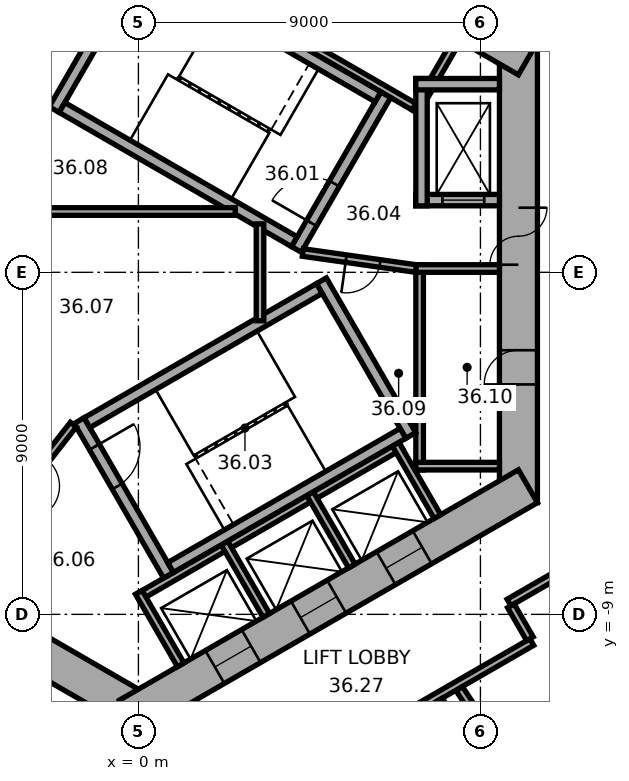
"""IFC4 building model, lengths in metres.
Left out: names, types, materials, properties, quantities, classifications, styles, units other than length and angle.
Written with IfcOpenShell. Run it as: python <this file> out.ifc"""

import sys

from ifc_helpers import new_model, si_unit, direction, frame, frame_2d, origin, place, context, subcontext, project, spatial, rectangle, extrude, element, fill, save


model = new_model("IFC4")
c1 = context("Model", 3, precision=1e-05, world=origin(), true_north=direction((0.0, 1.0)))
c2 = subcontext(c1, "Body", "Model", "MODEL_VIEW")
j1 = project(units=[si_unit("LENGTHUNIT", "METRE"), si_unit("PLANEANGLEUNIT", "RADIAN")], contexts=[c1])
p1 = place(None, origin())
s1 = spatial("IfcSite", under=j1, at=p1, CompositionType="ELEMENT")
p2 = place(p1, origin())
s2 = spatial("IfcBuilding", under=s1, at=p2, CompositionType="ELEMENT")
p3 = place(p2, frame((0.0, 0.0, 150.3)))
s3 = spatial("IfcBuildingStorey", under=s2, at=p3, CompositionType="ELEMENT", Elevation=150.3)
p4 = place(p3, frame((10.0, -6.062, 0.0), z_axis=(0.0, 0.0, 1.0), x_axis=(0.0, 1.0, 0.0)))
e1 = element("IfcWall", 1, at=p4, inside=s3, PredefinedType="SHEAR", context=c2, shape_type="SweptSolid", body=[
    extrude(rectangle(XDim=12.125, YDim=1.0, at=frame_2d((6.062, 0.0))), origin(), (0.0, 0.0, 1.0), 3.7),
])
p5 = place(p4, frame((6.262, 0.0, 0.0)))
e2 = element("IfcOpeningElement", 2, at=p5, cuts=e1, PredefinedType="OPENING", context=c2, shape_type="SweptSolid", body=[
    extrude(rectangle(XDim=1.5, YDim=2.1, at=frame_2d((0.75, 1.05))), frame((0.0, 0.51, 0.0), z_axis=(0.0, -1.0, 0.0), x_axis=(1.0, 0.0, 0.0)), (0.0, 0.0, 1.0), 1.02),
])
p6 = place(p4, frame((3.112, 0.0, 0.0)))
e3 = element("IfcOpeningElement", 3, at=p6, cuts=e1, PredefinedType="OPENING", context=c2, shape_type="SweptSolid", body=[
    extrude(rectangle(XDim=0.9, YDim=2.1, at=frame_2d((0.45, 1.05))), frame((0.0, 0.51, 0.0), z_axis=(0.0, -1.0, 0.0), x_axis=(1.0, 0.0, 0.0)), (0.0, 0.0, 1.0), 1.02),
])
p7 = place(p3, frame((10.25, 5.629, 0.0), z_axis=(0.0, 0.0, 1.0), x_axis=(-0.866022616891, 0.50000482701, 0.0)))
e4 = element("IfcWall", 4, at=p7, inside=s3, PredefinedType="SHEAR", context=c2, shape_type="SweptSolid", body=[
    extrude(rectangle(XDim=12.125, YDim=1.0, at=frame_2d((6.062, 0.0))), origin(), (0.0, 0.0, 1.0), 3.7),
])
p8 = place(p7, frame((4.012, 0.0, 0.0)))
e5 = element("IfcOpeningElement", 5, at=p8, cuts=e4, PredefinedType="OPENING", context=c2, shape_type="SweptSolid", body=[
    extrude(rectangle(XDim=0.9, YDim=2.1, at=frame_2d((0.45, 1.05))), frame((0.0, 0.51, 0.0), z_axis=(0.0, -1.0, 0.0), x_axis=(1.0, 0.0, 0.0)), (0.0, 0.0, 1.0), 1.02),
])
p9 = place(p7, frame((7.912, 0.0, 0.0)))
e6 = element("IfcOpeningElement", 6, at=p9, cuts=e4, PredefinedType="OPENING", context=c2, shape_type="SweptSolid", body=[
    extrude(rectangle(XDim=0.9, YDim=2.1, at=frame_2d((0.45, 1.05))), frame((0.0, 0.51, 0.0), z_axis=(0.0, -1.0, 0.0), x_axis=(1.0, 0.0, 0.0)), (0.0, 0.0, 1.0), 1.02),
])
p10 = place(p3, frame((0.25, 11.691, 0.0), z_axis=(0.0, 0.0, 1.0), x_axis=(-0.866022616891, -0.50000482701, 0.0)))
e7 = element("IfcWall", 7, at=p10, inside=s3, PredefinedType="SHEAR", context=c2, shape_type="SweptSolid", body=[
    extrude(rectangle(XDim=12.125, YDim=1.0, at=frame_2d((6.062, 0.0))), origin(), (0.0, 0.0, 1.0), 3.7),
])
p11 = place(p10, frame((6.262, 0.0, 0.0)))
e8 = element("IfcOpeningElement", 8, at=p11, cuts=e7, PredefinedType="OPENING", context=c2, shape_type="SweptSolid", body=[
    extrude(rectangle(XDim=1.5, YDim=2.1, at=frame_2d((0.75, 1.05))), frame((0.0, 0.51, 0.0), z_axis=(0.0, -1.0, 0.0), x_axis=(1.0, 0.0, 0.0)), (0.0, 0.0, 1.0), 1.02),
])
p12 = place(p10, frame((1.812, 0.0, 0.0)))
e9 = element("IfcOpeningElement", 9, at=p12, cuts=e7, PredefinedType="OPENING", context=c2, shape_type="SweptSolid", body=[
    extrude(rectangle(XDim=0.9, YDim=2.1, at=frame_2d((0.45, 1.05))), frame((0.0, 0.51, 0.0), z_axis=(0.0, -1.0, 0.0), x_axis=(1.0, 0.0, 0.0)), (0.0, 0.0, 1.0), 1.02),
])
p13 = place(p10, frame((4.412, 0.0, 0.0)))
e10 = element("IfcOpeningElement", 10, at=p13, cuts=e7, PredefinedType="OPENING", context=c2, shape_type="SweptSolid", body=[
    extrude(rectangle(XDim=0.9, YDim=2.1, at=frame_2d((0.45, 1.05))), frame((0.0, 0.51, 0.0), z_axis=(0.0, -1.0, 0.0), x_axis=(1.0, 0.0, 0.0)), (0.0, 0.0, 1.0), 1.02),
])
p14 = place(p3, frame((-10.25, -5.629, 0.0), z_axis=(0.0, 0.0, 1.0), x_axis=(0.866022616891, -0.50000482701, 0.0)))
e11 = element("IfcWall", 11, at=p14, inside=s3, PredefinedType="SHEAR", context=c2, shape_type="SweptSolid", body=[
    extrude(rectangle(XDim=12.125, YDim=1.0, at=frame_2d((6.062, 0.0))), origin(), (0.0, 0.0, 1.0), 3.7),
])
p15 = place(p14, frame((6.262, 0.0, 0.0)))
e12 = element("IfcOpeningElement", 12, at=p15, cuts=e11, PredefinedType="OPENING", context=c2, shape_type="SweptSolid", body=[
    extrude(rectangle(XDim=1.5, YDim=2.1, at=frame_2d((0.75, 1.05))), frame((0.0, 0.51, 0.0), z_axis=(0.0, -1.0, 0.0), x_axis=(1.0, 0.0, 0.0)), (0.0, 0.0, 1.0), 1.02),
])
p16 = place(p14, frame((1.712, 0.0, 0.0)))
e13 = element("IfcOpeningElement", 13, at=p16, cuts=e11, PredefinedType="OPENING", context=c2, shape_type="SweptSolid", body=[
    extrude(rectangle(XDim=1.1, YDim=2.1, at=frame_2d((0.55, 1.05))), frame((0.0, 0.51, 0.0), z_axis=(0.0, -1.0, 0.0), x_axis=(1.0, 0.0, 0.0)), (0.0, 0.0, 1.0), 1.02),
])
p17 = place(p14, frame((4.312, 0.0, 0.0)))
e14 = element("IfcOpeningElement", 14, at=p17, cuts=e11, PredefinedType="OPENING", context=c2, shape_type="SweptSolid", body=[
    extrude(rectangle(XDim=1.1, YDim=2.1, at=frame_2d((0.55, 1.05))), frame((0.0, 0.51, 0.0), z_axis=(0.0, -1.0, 0.0), x_axis=(1.0, 0.0, 0.0)), (0.0, 0.0, 1.0), 1.02),
])
p18 = place(p3, frame((-0.25, -11.691, 0.0), z_axis=(0.0, 0.0, 1.0), x_axis=(0.866022616891, 0.50000482701, 0.0)))
e15 = element("IfcWall", 15, at=p18, inside=s3, PredefinedType="SHEAR", context=c2, shape_type="SweptSolid", body=[
    extrude(rectangle(XDim=12.125, YDim=1.0, at=frame_2d((6.062, 0.0))), origin(), (0.0, 0.0, 1.0), 3.7),
])
p19 = place(p18, frame((2.612, 0.0, 0.0)))
e16 = element("IfcOpeningElement", 16, at=p19, cuts=e15, PredefinedType="OPENING", context=c2, shape_type="SweptSolid", body=[
    extrude(rectangle(XDim=1.1, YDim=2.1, at=frame_2d((0.55, 1.05))), frame((0.0, 0.51, 0.0), z_axis=(0.0, -1.0, 0.0), x_axis=(1.0, 0.0, 0.0)), (0.0, 0.0, 1.0), 1.02),
])
p20 = place(p18, frame((5.212, 0.0, 0.0)))
e17 = element("IfcOpeningElement", 17, at=p20, cuts=e15, PredefinedType="OPENING", context=c2, shape_type="SweptSolid", body=[
    extrude(rectangle(XDim=1.1, YDim=2.1, at=frame_2d((0.55, 1.05))), frame((0.0, 0.51, 0.0), z_axis=(0.0, -1.0, 0.0), x_axis=(1.0, 0.0, 0.0)), (0.0, 0.0, 1.0), 1.02),
])
p21 = place(p18, frame((7.812, 0.0, 0.0)))
e18 = element("IfcOpeningElement", 18, at=p21, cuts=e15, PredefinedType="OPENING", context=c2, shape_type="SweptSolid", body=[
    extrude(rectangle(XDim=1.1, YDim=2.1, at=frame_2d((0.55, 1.05))), frame((0.0, 0.51, 0.0), z_axis=(0.0, -1.0, 0.0), x_axis=(1.0, 0.0, 0.0)), (0.0, 0.0, 1.0), 1.02),
])
p22 = place(p3, frame((7.4, -5.2, 0.0), z_axis=(0.0, 0.0, 1.0), x_axis=(0.0, 1.0, 0.0)))
e19 = element("IfcWall", 19, at=p22, inside=s3, PredefinedType="PARTITIONING", context=c2, shape_type="SweptSolid", body=[
    extrude(rectangle(XDim=5.4, YDim=0.2, at=frame_2d((2.7, 0.0))), origin(), (0.0, 0.0, 1.0), 3.42),
])
for number, where, z_axis, x_axis in (
    (20, (7.3, -5.1, 0.0), (0.0, 0.0, 1.0), (1.0, 0.0, 0.0)),
    (21, (7.3, 0.1, 0.0), (0.0, 0.0, 1.0), (1.0, 0.0, 0.0)),
):
    element("IfcWall", number, at=place(p3, frame(where, z_axis=z_axis, x_axis=x_axis)), inside=s3, PredefinedType="PARTITIONING", context=c2, shape_type="SweptSolid", body=[
        extrude(rectangle(XDim=2.2, YDim=0.2, at=frame_2d((1.1, 0.0))), origin(), (0.0, 0.0, 1.0), 3.42),
    ])
p23 = place(p3, frame((7.424, 4.259, 0.0), z_axis=(0.0, 0.0, 1.0), x_axis=(-0.866026010844, 0.49999894854, 0.0)))
e22 = element("IfcWall", 22, at=p23, inside=s3, PredefinedType="PARTITIONING", context=c2, shape_type="SweptSolid", body=[
    extrude(rectangle(XDim=8.0, YDim=0.2, at=frame_2d((4.0, 0.0))), origin(), (0.0, 0.0, 1.0), 3.42),
])
p24 = place(p3, frame((7.287, 4.222, 0.0), z_axis=(0.0, 0.0, 1.0), x_axis=(0.499946605688, 0.86605622881, 0.0)))
e23 = element("IfcWall", 23, at=p24, inside=s3, PredefinedType="PARTITIONING", context=c2, shape_type="SweptSolid", body=[
    extrude(rectangle(XDim=2.2, YDim=0.2, at=frame_2d((1.1, 0.0))), origin(), (0.0, 0.0, 1.0), 3.42),
])
p25 = place(p3, frame((-0.024, -8.559, 0.0), z_axis=(0.0, 0.0, 1.0), x_axis=(0.866026010844, 0.49999894854, 0.0)))
e24 = element("IfcWall", 24, at=p25, inside=s3, PredefinedType="PARTITIONING", context=c2, shape_type="SweptSolid", body=[
    extrude(rectangle(XDim=8.0, YDim=0.2, at=frame_2d((4.0, 0.0))), origin(), (0.0, 0.0, 1.0), 3.42),
])
for number, where, z_axis, x_axis in (
    (25, (0.013, -8.422, 0.0), (0.0, 0.0, 1.0), (0.5, -0.866, 0.0)),
    (26, (2.264, -7.122, 0.0), (0.0, 0.0, 1.0), (0.5, -0.866, 0.0)),
    (27, (4.516, -5.822, 0.0), (0.0, 0.0, 1.0), (0.5, -0.866, 0.0)),
    (28, (6.768, -4.522, 0.0), (0.0, 0.0, 1.0), (0.5, -0.866, 0.0)),
):
    element("IfcWall", number, at=place(p3, frame(where, z_axis=z_axis, x_axis=x_axis)), inside=s3, PredefinedType="PARTITIONING", context=c2, shape_type="SweptSolid", body=[
        extrude(rectangle(XDim=2.2, YDim=0.2, at=frame_2d((1.1, 0.0))), origin(), (0.0, 0.0, 1.0), 3.42),
    ])
p26 = place(p3, frame((4.158, 0.602, 0.0), z_axis=(0.0, 0.0, 1.0), x_axis=(0.499977259774, 0.866038532462, 0.0)))
e29 = element("IfcWall", 29, at=p26, inside=s3, PredefinedType="SHEAR", context=c2, shape_type="SweptSolid", body=[
    extrude(rectangle(XDim=4.7, YDim=0.3, at=frame_2d((2.35, 0.0))), origin(), (0.0, 0.0, 1.0), 3.42),
])
p27 = place(p26, frame((0.8, 0.0, 0.0)))
e30 = element("IfcOpeningElement", 30, at=p27, cuts=e29, PredefinedType="OPENING", context=c2, shape_type="SweptSolid", body=[
    extrude(rectangle(XDim=1.2, YDim=2.1, at=frame_2d((0.6, 1.05))), frame((0.0, 0.16, 0.0), z_axis=(0.0, -1.0, 0.0), x_axis=(1.0, 0.0, 0.0)), (0.0, 0.0, 1.0), 0.32),
])
p28 = place(p3, frame((-2.216, 4.282, 0.0), z_axis=(0.0, 0.0, 1.0), x_axis=(0.499977259774, 0.866038532462, 0.0)))
e31 = element("IfcWall", 31, at=p28, inside=s3, PredefinedType="SHEAR", context=c2, shape_type="SweptSolid", body=[
    extrude(rectangle(XDim=4.7, YDim=0.3, at=frame_2d((2.35, 0.0))), origin(), (0.0, 0.0, 1.0), 3.42),
])
for number, where, z_axis, x_axis in (
    (32, (4.103, 0.807, 0.0), (0.0, 0.0, 1.0), (-0.866, 0.5, 0.0)),
    (33, (6.303, 4.617, 0.0), (0.0, 0.0, 1.0), (-0.866, 0.5, 0.0)),
):
    element("IfcWall", number, at=place(p3, frame(where, z_axis=z_axis, x_axis=x_axis)), inside=s3, PredefinedType="SHEAR", context=c2, shape_type="SweptSolid", body=[
        extrude(rectangle(XDim=7.06, YDim=0.3, at=frame_2d((3.53, 0.0))), origin(), (0.0, 0.0, 1.0), 3.42),
    ])
p29 = place(p3, frame((-1.558, -3.902, 0.0), z_axis=(0.0, 0.0, 1.0), x_axis=(0.499977259774, -0.866038532462, 0.0)))
e34 = element("IfcWall", 34, at=p29, inside=s3, PredefinedType="SHEAR", context=c2, shape_type="SweptSolid", body=[
    extrude(rectangle(XDim=4.7, YDim=0.3, at=frame_2d((2.35, 0.0))), origin(), (0.0, 0.0, 1.0), 3.42),
])
p30 = place(p29, frame((0.8, 0.0, 0.0)))
e35 = element("IfcOpeningElement", 35, at=p30, cuts=e34, PredefinedType="OPENING", context=c2, shape_type="SweptSolid", body=[
    extrude(rectangle(XDim=1.2, YDim=2.1, at=frame_2d((0.6, 1.05))), frame((0.0, 0.16, 0.0), z_axis=(0.0, -1.0, 0.0), x_axis=(1.0, 0.0, 0.0)), (0.0, 0.0, 1.0), 0.32),
])
p31 = place(p3, frame((4.816, -0.222, 0.0), z_axis=(0.0, 0.0, 1.0), x_axis=(0.499977259774, -0.866038532462, 0.0)))
e36 = element("IfcWall", 36, at=p31, inside=s3, PredefinedType="SHEAR", context=c2, shape_type="SweptSolid", body=[
    extrude(rectangle(XDim=4.7, YDim=0.3, at=frame_2d((2.35, 0.0))), origin(), (0.0, 0.0, 1.0), 3.42),
])
for number, where, z_axis, x_axis in (
    (37, (-1.353, -3.957, 0.0), (0.0, 0.0, 1.0), (0.866, 0.5, 0.0)),
    (38, (0.847, -7.767, 0.0), (0.0, 0.0, 1.0), (0.866, 0.5, 0.0)),
):
    element("IfcWall", number, at=place(p3, frame(where, z_axis=z_axis, x_axis=x_axis)), inside=s3, PredefinedType="SHEAR", context=c2, shape_type="SweptSolid", body=[
        extrude(rectangle(XDim=7.06, YDim=0.3, at=frame_2d((3.53, 0.0))), origin(), (0.0, 0.0, 1.0), 3.42),
    ])
p32 = place(p3, frame((7.3, 1.9, 0.0), z_axis=(0.0, 0.0, 1.0), x_axis=(1.0, 0.0, 0.0)))
e39 = element("IfcWall", 39, at=p32, inside=s3, PredefinedType="SHEAR", context=c2, shape_type="SweptSolid", body=[
    extrude(rectangle(XDim=2.2, YDim=0.3, at=frame_2d((1.1, 0.0))), origin(), (0.0, 0.0, 1.0), 3.42),
])
p33 = place(p32, frame((0.7, 0.0, 0.0)))
e40 = element("IfcOpeningElement", 40, at=p33, cuts=e39, PredefinedType="OPENING", context=c2, shape_type="SweptSolid", body=[
    extrude(rectangle(XDim=1.1, YDim=2.1, at=frame_2d((0.55, 1.05))), frame((0.0, 0.16, 0.0), z_axis=(0.0, -1.0, 0.0), x_axis=(1.0, 0.0, 0.0)), (0.0, 0.0, 1.0), 0.32),
])
p34 = place(p3, frame((7.45, 1.75, 0.0), z_axis=(0.0, 0.0, 1.0), x_axis=(0.0, 1.0, 0.0)))
e41 = element("IfcWall", 41, at=p34, inside=s3, PredefinedType="SHEAR", context=c2, shape_type="SweptSolid", body=[
    extrude(rectangle(XDim=3.35, YDim=0.3, at=frame_2d((1.675, 0.0))), origin(), (0.0, 0.0, 1.0), 3.42),
])
p35 = place(p3, frame((7.3, 4.95, 0.0), z_axis=(0.0, 0.0, 1.0), x_axis=(1.0, 0.0, 0.0)))
e42 = element("IfcWall", 42, at=p35, inside=s3, PredefinedType="SHEAR", context=c2, shape_type="SweptSolid", body=[
    extrude(rectangle(XDim=2.2, YDim=0.3, at=frame_2d((1.1, 0.0))), origin(), (0.0, 0.0, 1.0), 3.42),
])
p36 = place(p3, frame((4.327, 0.521, 0.0), z_axis=(0.0, 0.0, 1.0), x_axis=(0.990124376366, -0.14019172346, 0.0)))
e43 = element("IfcWall", 43, at=p36, inside=s3, PredefinedType="PARTITIONING", context=c2, shape_type="SweptSolid", body=[
    extrude(rectangle(XDim=3.002, YDim=0.2, at=frame_2d((1.501, 0.0))), origin(), (0.0, 0.0, 1.0), 3.42),
])
p37 = place(p36, frame((1.15, 0.0, 0.0)))
e44 = element("IfcOpeningElement", 44, at=p37, cuts=e43, PredefinedType="OPENING", context=c2, shape_type="SweptSolid", body=[
    extrude(rectangle(XDim=0.9, YDim=2.1, at=frame_2d((0.45, 1.05))), frame((0.0, 0.11, 0.0), z_axis=(0.0, -1.0, 0.0), x_axis=(1.0, 0.0, 0.0)), (0.0, 0.0, 1.0), 0.22),
])
p38 = place(p3, frame((-1.712, -4.008, 0.0), z_axis=(0.0, 0.0, 1.0), x_axis=(-0.616549420702, -0.787316208287, 0.0)))
e45 = element("IfcWall", 45, at=p38, inside=s3, PredefinedType="PARTITIONING", context=c2, shape_type="SweptSolid", body=[
    extrude(rectangle(XDim=3.002, YDim=0.2, at=frame_2d((1.501, 0.0))), origin(), (0.0, 0.0, 1.0), 3.42),
])
p39 = place(p38, frame((1.15, 0.0, 0.0)))
e46 = element("IfcOpeningElement", 46, at=p39, cuts=e45, PredefinedType="OPENING", context=c2, shape_type="SweptSolid", body=[
    extrude(rectangle(XDim=0.9, YDim=2.1, at=frame_2d((0.45, 1.05))), frame((0.0, 0.11, 0.0), z_axis=(0.0, -1.0, 0.0), x_axis=(1.0, 0.0, 0.0)), (0.0, 0.0, 1.0), 0.22),
])
p40 = place(p3, frame((-2.72, 1.6, 0.0), z_axis=(0.0, 0.0, 1.0), x_axis=(1.0, 0.0, 0.0)))
e47 = element("IfcWall", 47, at=p40, inside=s3, PredefinedType="PARTITIONING", context=c2, shape_type="SweptSolid", body=[
    extrude(rectangle(XDim=5.269, YDim=0.2, at=frame_2d((2.634, 0.0))), origin(), (0.0, 0.0, 1.0), 3.42),
])
p41 = place(p3, frame((3.2, -1.275, 0.0), z_axis=(0.0, 0.0, 1.0), x_axis=(0.0, 1.0, 0.0)))
e48 = element("IfcWall", 48, at=p41, inside=s3, PredefinedType="PARTITIONING", context=c2, shape_type="SweptSolid", body=[
    extrude(rectangle(XDim=2.549, YDim=0.2, at=frame_2d((1.275, 0.0))), origin(), (0.0, 0.0, 1.0), 3.42),
])
p42 = place(p3, frame((4.955, -12.844, 0.0), z_axis=(0.0, 0.0, 1.0), x_axis=(0.86602379309, 0.500002789795, 0.0)))
e49 = element("IfcWall", 49, at=p42, inside=s3, PredefinedType="PARTITIONING", context=c2, shape_type="SweptSolid", body=[
    extrude(rectangle(XDim=6.232, YDim=0.2, at=frame_2d((3.116, 0.0))), origin(), (0.0, 0.0, 1.0), 3.42),
])
p43 = place(p3, frame((7.949, -11.231, 0.0), z_axis=(0.0, 0.0, 1.0), x_axis=(0.500010275428, -0.866019471182, 0.0)))
e50 = element("IfcWall", 50, at=p43, inside=s3, PredefinedType="PARTITIONING", context=c2, shape_type="SweptSolid", body=[
    extrude(rectangle(XDim=3.5, YDim=0.12, at=frame_2d((1.75, 0.0))), origin(), (0.0, 0.0, 1.0), 3.42),
])
p44 = place(p3, frame((9.752, -8.688, 0.0), z_axis=(0.0, 0.0, 1.0), x_axis=(0.865974105138, 0.500088841337, 0.0)))
e51 = element("IfcWall", 51, at=p44, inside=s3, PredefinedType="PARTITIONING", context=c2, shape_type="SweptSolid", body=[
    extrude(rectangle(XDim=1.961, YDim=0.2, at=frame_2d((0.98, 0.0))), origin(), (0.0, 0.0, 1.0), 3.42),
])
p45 = place(p3, frame((10.302, -9.642, 0.0), z_axis=(0.0, 0.0, 1.0), x_axis=(-0.500074377092, 0.865982457891, 0.0)))
e52 = element("IfcWall", 52, at=p45, inside=s3, PredefinedType="PARTITIONING", context=c2, shape_type="SweptSolid", body=[
    extrude(rectangle(XDim=1.001, YDim=0.2, at=frame_2d((0.5, 0.0))), origin(), (0.0, 0.0, 1.0), 3.42),
])
p46 = place(p3, frame((12.281, -16.755, 0.0), z_axis=(0.0, 0.0, 1.0), x_axis=(-0.551925794663, 0.833893228888, 0.0)))
e53 = element("IfcWall", 53, at=p46, inside=s3, PredefinedType="PARTITIONING", context=c2, shape_type="SweptSolid", body=[
    extrude(rectangle(XDim=6.953, YDim=0.2, at=frame_2d((3.476, 0.0))), origin(), (0.0, 0.0, 1.0), 3.42),
])
p47 = place(p5, origin())
e54 = element("IfcDoor", 54, at=p47, inside=s3, OperationType="DOUBLE_DOOR_SINGLE_SWING", PredefinedType="DOOR", context=c2, shape_type="SweptSolid", body=[
    extrude(rectangle(XDim=1.5, YDim=2.1, at=frame_2d((0.75, 1.05))), frame((0.0, 0.025, 0.0), z_axis=(0.0, -1.0, 0.0), x_axis=(1.0, 0.0, 0.0)), (0.0, 0.0, 1.0), 0.05),
])
fill(e2, e54)
p48 = place(p27, origin())
e55 = element("IfcDoor", 55, at=p48, inside=s3, OperationType="SINGLE_SWING_RIGHT", PredefinedType="DOOR", context=c2, shape_type="SweptSolid", body=[
    extrude(rectangle(XDim=1.2, YDim=2.1, at=frame_2d((0.6, 1.05))), frame((0.0, 0.025, 0.0), z_axis=(0.0, -1.0, 0.0), x_axis=(1.0, 0.0, 0.0)), (0.0, 0.0, 1.0), 0.05),
])
fill(e30, e55)
p49 = place(p30, origin())
e56 = element("IfcDoor", 56, at=p49, inside=s3, OperationType="SINGLE_SWING_RIGHT", PredefinedType="DOOR", context=c2, shape_type="SweptSolid", body=[
    extrude(rectangle(XDim=1.2, YDim=2.1, at=frame_2d((0.6, 1.05))), frame((0.0, 0.025, 0.0), z_axis=(0.0, -1.0, 0.0), x_axis=(1.0, 0.0, 0.0)), (0.0, 0.0, 1.0), 0.05),
])
fill(e35, e56)
p50 = place(p37, origin())
e57 = element("IfcDoor", 57, at=p50, inside=s3, OperationType="SINGLE_SWING_LEFT", PredefinedType="DOOR", context=c2, shape_type="SweptSolid", body=[
    extrude(rectangle(XDim=0.9, YDim=2.1, at=frame_2d((0.45, 1.05))), frame((0.0, 0.025, 0.0), z_axis=(0.0, -1.0, 0.0), x_axis=(1.0, 0.0, 0.0)), (0.0, 0.0, 1.0), 0.05),
])
fill(e44, e57)
p51 = place(p6, origin())
e58 = element("IfcDoor", 58, at=p51, inside=s3, OperationType="SINGLE_SWING_LEFT", PredefinedType="DOOR", context=c2, shape_type="SweptSolid", body=[
    extrude(rectangle(XDim=0.9, YDim=2.1, at=frame_2d((0.45, 1.05))), frame((0.0, 0.025, 0.0), z_axis=(0.0, -1.0, 0.0), x_axis=(1.0, 0.0, 0.0)), (0.0, 0.0, 1.0), 0.05),
])
fill(e3, e58)
p52 = place(p33, origin())
e59 = element("IfcDoor", 59, at=p52, inside=s3, OperationType="DOUBLE_DOOR_SLIDING", PredefinedType="DOOR", context=c2, shape_type="SweptSolid", body=[
    extrude(rectangle(XDim=1.1, YDim=2.1, at=frame_2d((0.55, 1.05))), frame((0.0, 0.025, 0.0), z_axis=(0.0, -1.0, 0.0), x_axis=(1.0, 0.0, 0.0)), (0.0, 0.0, 1.0), 0.05),
])
fill(e40, e59)
p53 = place(p19, origin())
e60 = element("IfcDoor", 60, at=p53, inside=s3, OperationType="DOUBLE_DOOR_SLIDING", PredefinedType="DOOR", context=c2, shape_type="SweptSolid", body=[
    extrude(rectangle(XDim=1.1, YDim=2.1, at=frame_2d((0.55, 1.05))), frame((0.0, 0.025, 0.0), z_axis=(0.0, -1.0, 0.0), x_axis=(1.0, 0.0, 0.0)), (0.0, 0.0, 1.0), 0.05),
])
fill(e16, e60)
p54 = place(p20, origin())
e61 = element("IfcDoor", 61, at=p54, inside=s3, OperationType="DOUBLE_DOOR_SLIDING", PredefinedType="DOOR", context=c2, shape_type="SweptSolid", body=[
    extrude(rectangle(XDim=1.1, YDim=2.1, at=frame_2d((0.55, 1.05))), frame((0.0, 0.025, 0.0), z_axis=(0.0, -1.0, 0.0), x_axis=(1.0, 0.0, 0.0)), (0.0, 0.0, 1.0), 0.05),
])
fill(e17, e61)
p55 = place(p21, origin())
e62 = element("IfcDoor", 62, at=p55, inside=s3, OperationType="DOUBLE_DOOR_SLIDING", PredefinedType="DOOR", context=c2, shape_type="SweptSolid", body=[
    extrude(rectangle(XDim=1.1, YDim=2.1, at=frame_2d((0.55, 1.05))), frame((0.0, 0.025, 0.0), z_axis=(0.0, -1.0, 0.0), x_axis=(1.0, 0.0, 0.0)), (0.0, 0.0, 1.0), 0.05),
])
fill(e18, e62)
save(model, sys.argv[1])
